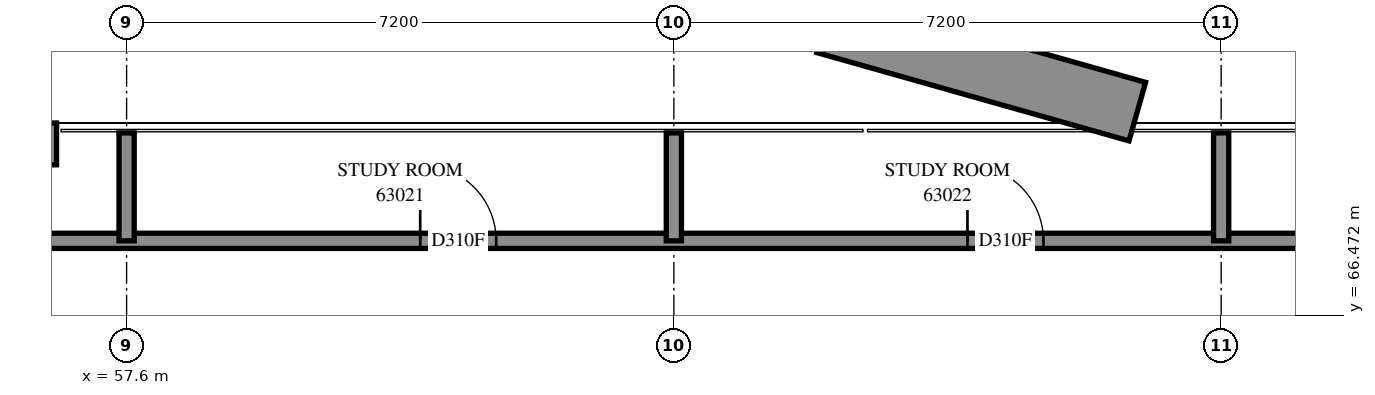
"""IFC4 building model, lengths in metres.
Left out: names, types, materials, properties, quantities, classifications, styles, units other than length and angle.
Written with IfcOpenShell. Run it as: python <this file> out.ifc"""

import sys

from ifc_helpers import new_model, si_unit, direction, frame, frame_2d, origin, place, context, subcontext, project, spatial, rectangle, extrude, element, fill, save


model = new_model("IFC4")
c1 = context("Model", 3, precision=1e-05, world=origin(), true_north=direction((0.0, 1.0)))
c2 = subcontext(c1, "Body", "Model", "MODEL_VIEW")
j1 = project(units=[si_unit("LENGTHUNIT", "METRE"), si_unit("PLANEANGLEUNIT", "RADIAN")], contexts=[c1])
p1 = place(None, origin())
s1 = spatial("IfcSite", under=j1, at=p1, CompositionType="ELEMENT")
p2 = place(p1, origin())
s2 = spatial("IfcBuilding", under=s1, at=p2, CompositionType="ELEMENT")
p3 = place(p2, frame((0.0, 0.0, 230.4)))
s3 = spatial("IfcBuildingStorey", under=s2, at=p3, CompositionType="ELEMENT", Elevation=230.4)
p4 = place(p3, frame((56.678, 68.725, 0.0), z_axis=(0.0, 0.0, 1.0), x_axis=(-1.0, 0.0, 0.0)))
e1 = element("IfcWall", 1, at=p4, inside=s3, PredefinedType="SOLIDWALL", context=c2, shape_type="SweptSolid", body=[
    extrude(rectangle(XDim=3.6, YDim=0.55, at=frame_2d((1.8, 0.0))), origin(), (0.0, 0.0, 1.0), 3.9),
])
p5 = place(p4, frame((0.6, 0.0, 0.0)))
e2 = element("IfcOpeningElement", 2, at=p5, cuts=e1, PredefinedType="OPENING", context=c2, shape_type="SweptSolid", body=[
    extrude(rectangle(XDim=1.2, YDim=2.4, at=frame_2d((0.6, 1.2))), frame((0.0, 0.285, 0.0), z_axis=(0.0, -1.0, 0.0), x_axis=(1.0, 0.0, 0.0)), (0.0, 0.0, 1.0), 0.57),
])
p6 = place(p3, frame((70.897, 69.15, 0.0), z_axis=(0.0, 0.0, 1.0), x_axis=(-0.9622656728, 0.2721116957, 0.0)))
e3 = element("IfcWall", 3, at=p6, inside=s3, PredefinedType="SOLIDWALL", context=c2, shape_type="SweptSolid", body=[
    extrude(rectangle(XDim=4.269, YDim=0.8, at=frame_2d((2.134, 0.0))), origin(), (0.0, 0.0, 1.0), 0.65),
])
p7 = place(p3, frame((54.95, 67.45, 0.0), z_axis=(0.0, 0.0, 1.0), x_axis=(1.0, 0.0, 0.0)))
e4 = element("IfcWall", 4, at=p7, inside=s3, PredefinedType="PARTITIONING", context=c2, shape_type="SweptSolid", body=[
    extrude(rectangle(XDim=19.7, YDim=0.2, at=frame_2d((9.85, 0.0))), origin(), (0.0, 0.0, 1.0), 3.9),
])
p8 = place(p7, frame((6.513, 0.0, 0.0)))
e5 = element("IfcOpeningElement", 5, at=p8, cuts=e4, PredefinedType="OPENING", context=c2, shape_type="SweptSolid", body=[
    extrude(rectangle(XDim=1.0, YDim=2.1, at=frame_2d((0.5, 1.05))), frame((0.0, 0.11, 0.0), z_axis=(0.0, -1.0, 0.0), x_axis=(1.0, 0.0, 0.0)), (0.0, 0.0, 1.0), 0.22),
])
p9 = place(p7, frame((13.713, 0.0, 0.0)))
e6 = element("IfcOpeningElement", 6, at=p9, cuts=e4, PredefinedType="OPENING", context=c2, shape_type="SweptSolid", body=[
    extrude(rectangle(XDim=1.0, YDim=2.1, at=frame_2d((0.5, 1.05))), frame((0.0, 0.11, 0.0), z_axis=(0.0, -1.0, 0.0), x_axis=(1.0, 0.0, 0.0)), (0.0, 0.0, 1.0), 0.22),
])
for number, where, z_axis, x_axis in (
    (7, (57.6, 67.45, 0.0), (0.0, 0.0, 1.0), (0.0, 1.0, 0.0)),
    (8, (64.8, 67.45, 0.0), (0.0, 0.0, 1.0), (0.0, 1.0, 0.0)),
    (9, (72.0, 67.45, 0.0), (0.0, 0.0, 1.0), (0.0, 1.0, 0.0)),
):
    element("IfcWall", number, at=place(p3, frame(where, z_axis=z_axis, x_axis=x_axis)), inside=s3, PredefinedType="PARTITIONING", context=c2, shape_type="SweptSolid", body=[
        extrude(rectangle(XDim=1.42, YDim=0.2, at=frame_2d((0.71, 0.0))), origin(), (0.0, 0.0, 1.0), 3.9),
    ])
p10 = place(p8, origin())
e10 = element("IfcDoor", 10, at=p10, inside=s3, OperationType="SINGLE_SWING_RIGHT", PredefinedType="DOOR", context=c2, shape_type="SweptSolid", body=[
    extrude(rectangle(XDim=1.0, YDim=2.1, at=frame_2d((0.5, 1.05))), frame((0.0, 0.025, 0.0), z_axis=(0.0, -1.0, 0.0), x_axis=(1.0, 0.0, 0.0)), (0.0, 0.0, 1.0), 0.05),
])
fill(e5, e10)
p11 = place(p9, origin())
e11 = element("IfcDoor", 11, at=p11, inside=s3, OperationType="SINGLE_SWING_RIGHT", PredefinedType="DOOR", context=c2, shape_type="SweptSolid", body=[
    extrude(rectangle(XDim=1.0, YDim=2.1, at=frame_2d((0.5, 1.05))), frame((0.0, 0.025, 0.0), z_axis=(0.0, -1.0, 0.0), x_axis=(1.0, 0.0, 0.0)), (0.0, 0.0, 1.0), 0.05),
])
fill(e6, e11)
save(model, sys.argv[1])
